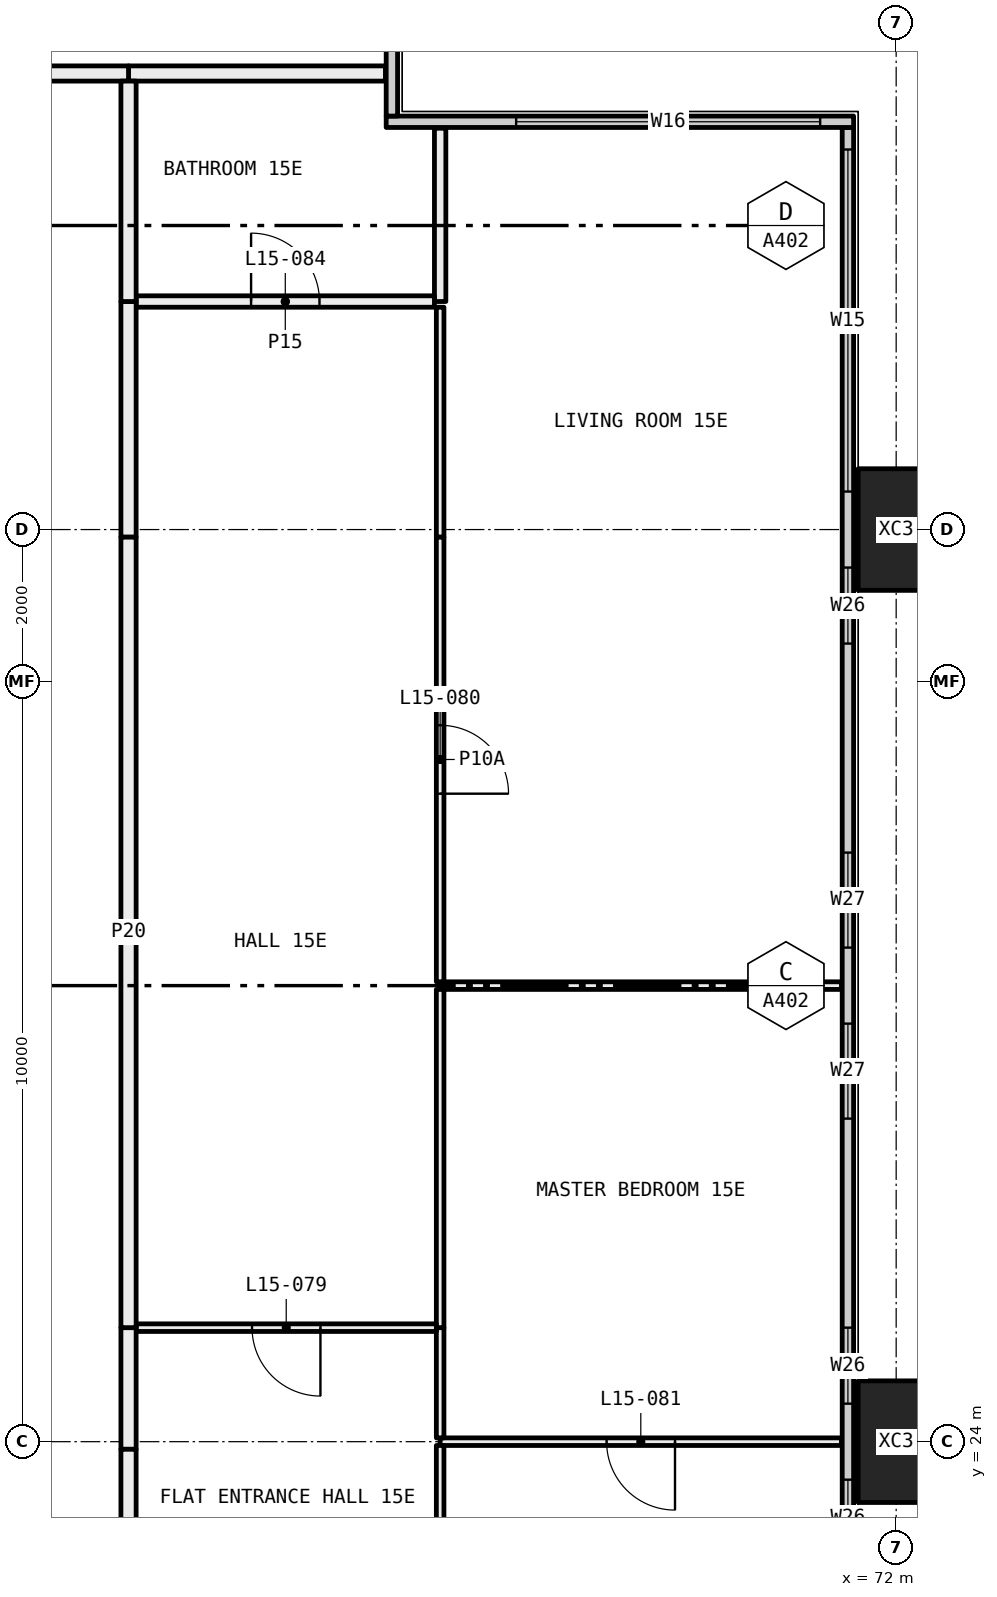
"""IFC4 building model, lengths in metres.
Left out: names, types, materials, properties, quantities, classifications, styles, units other than length and angle.
Written with IfcOpenShell. Run it as: python <this file> out.ifc"""

import sys

from ifc_helpers import new_model, si_unit, direction, frame, frame_2d, origin, origin_2d, place, context, subcontext, project, spatial, rectangle, hollow_rectangle, extrude, element, fill, save


model = new_model("IFC4")
c1 = context("Model", 3, precision=1e-05, world=origin(), true_north=direction((0.0, 1.0)))
c2 = subcontext(c1, "Body", "Model", "MODEL_VIEW")
j1 = project(units=[si_unit("LENGTHUNIT", "METRE"), si_unit("PLANEANGLEUNIT", "RADIAN")], contexts=[c1])
p1 = place(None, origin())
s1 = spatial("IfcSite", under=j1, at=p1, CompositionType="ELEMENT")
p2 = place(p1, origin())
s2 = spatial("IfcBuilding", under=s1, at=p2, CompositionType="ELEMENT")
p3 = place(p2, frame((0.0, 0.0, 64.5)))
s3 = spatial("IfcBuildingStorey", under=s2, at=p3, CompositionType="ELEMENT", Elevation=64.5)
for number, where, z_axis, x_axis in (
    (1, (72.0, 24.0, -0.4), (0.0, 0.0, 1.0), (0.0, 1.0, 0.0)),
    (2, (72.0, 36.0, -0.4), (0.0, 0.0, 1.0), (0.0, 1.0, 0.0)),
):
    element("IfcColumn", number, at=place(p3, frame(where, z_axis=z_axis, x_axis=x_axis)), inside=s3, PredefinedType="COLUMN", context=c2, shape_type="SweptSolid", body=[
        extrude(hollow_rectangle(XDim=1.6, YDim=1.0, WallThickness=0.065, at=origin_2d()), origin(), (0.0, 0.0, 1.0), 3.45),
    ])
p4 = place(p3, frame((71.365, 6.71, 0.0), z_axis=(0.0, 0.0, 1.0), x_axis=(0.0, 1.0, 0.0)))
e3 = element("IfcWall", 3, at=p4, inside=s3, PredefinedType="ELEMENTEDWALL", context=c2, shape_type="SweptSolid", body=[
    extrude(rectangle(XDim=34.58, YDim=0.15, at=frame_2d((17.29, 0.0))), origin(), (0.0, 0.0, 1.0), 3.05),
])
p5 = place(p4, frame((0.29, 0.0, 0.45)))
e4 = element("IfcOpeningElement", 4, at=p5, cuts=e3, PredefinedType="OPENING", context=c2, shape_type="SweptSolid", body=[
    extrude(rectangle(XDim=4.5, YDim=2.55, at=frame_2d((2.25, 1.275))), frame((0.0, 0.085, 0.0), z_axis=(0.0, -1.0, 0.0), x_axis=(1.0, 0.0, 0.0)), (0.0, 0.0, 1.0), 0.17),
])
p6 = place(p4, frame((5.79, 0.0, 0.45)))
e5 = element("IfcOpeningElement", 5, at=p6, cuts=e3, PredefinedType="OPENING", context=c2, shape_type="SweptSolid", body=[
    extrude(rectangle(XDim=1.0, YDim=2.55, at=frame_2d((0.5, 1.275))), frame((0.0, 0.085, 0.0), z_axis=(0.0, -1.0, 0.0), x_axis=(1.0, 0.0, 0.0)), (0.0, 0.0, 1.0), 0.17),
])
p7 = place(p4, frame((9.54, 0.0, 0.45)))
e6 = element("IfcOpeningElement", 6, at=p7, cuts=e3, PredefinedType="OPENING", context=c2, shape_type="SweptSolid", body=[
    extrude(rectangle(XDim=1.25, YDim=2.55, at=frame_2d((0.625, 1.275))), frame((0.0, 0.085, 0.0), z_axis=(0.0, -1.0, 0.0), x_axis=(1.0, 0.0, 0.0)), (0.0, 0.0, 1.0), 0.17),
])
p8 = place(p4, frame((11.79, 0.0, 0.45)))
e7 = element("IfcOpeningElement", 7, at=p8, cuts=e3, PredefinedType="OPENING", context=c2, shape_type="SweptSolid", body=[
    extrude(rectangle(XDim=1.25, YDim=2.55, at=frame_2d((0.625, 1.275))), frame((0.0, 0.085, 0.0), z_axis=(0.0, -1.0, 0.0), x_axis=(1.0, 0.0, 0.0)), (0.0, 0.0, 1.0), 0.17),
])
p9 = place(p4, frame((15.79, 0.0, 0.45)))
e8 = element("IfcOpeningElement", 8, at=p9, cuts=e3, PredefinedType="OPENING", context=c2, shape_type="SweptSolid", body=[
    extrude(rectangle(XDim=1.0, YDim=2.55, at=frame_2d((0.5, 1.275))), frame((0.0, 0.085, 0.0), z_axis=(0.0, -1.0, 0.0), x_axis=(1.0, 0.0, 0.0)), (0.0, 0.0, 1.0), 0.17),
])
p10 = place(p4, frame((17.79, 0.0, 0.45)))
e9 = element("IfcOpeningElement", 9, at=p10, cuts=e3, PredefinedType="OPENING", context=c2, shape_type="SweptSolid", body=[
    extrude(rectangle(XDim=1.0, YDim=2.55, at=frame_2d((0.5, 1.275))), frame((0.0, 0.085, 0.0), z_axis=(0.0, -1.0, 0.0), x_axis=(1.0, 0.0, 0.0)), (0.0, 0.0, 1.0), 0.17),
])
p11 = place(p4, frame((21.54, 0.0, 0.45)))
e10 = element("IfcOpeningElement", 10, at=p11, cuts=e3, PredefinedType="OPENING", context=c2, shape_type="SweptSolid", body=[
    extrude(rectangle(XDim=1.25, YDim=2.55, at=frame_2d((0.625, 1.275))), frame((0.0, 0.085, 0.0), z_axis=(0.0, -1.0, 0.0), x_axis=(1.0, 0.0, 0.0)), (0.0, 0.0, 1.0), 0.17),
])
p12 = place(p4, frame((23.79, 0.0, 0.45)))
e11 = element("IfcOpeningElement", 11, at=p12, cuts=e3, PredefinedType="OPENING", context=c2, shape_type="SweptSolid", body=[
    extrude(rectangle(XDim=1.25, YDim=2.55, at=frame_2d((0.625, 1.275))), frame((0.0, 0.085, 0.0), z_axis=(0.0, -1.0, 0.0), x_axis=(1.0, 0.0, 0.0)), (0.0, 0.0, 1.0), 0.17),
])
p13 = place(p4, frame((27.79, 0.0, 0.45)))
e12 = element("IfcOpeningElement", 12, at=p13, cuts=e3, PredefinedType="OPENING", context=c2, shape_type="SweptSolid", body=[
    extrude(rectangle(XDim=1.0, YDim=2.55, at=frame_2d((0.5, 1.275))), frame((0.0, 0.085, 0.0), z_axis=(0.0, -1.0, 0.0), x_axis=(1.0, 0.0, 0.0)), (0.0, 0.0, 1.0), 0.17),
])
p14 = place(p4, frame((29.79, 0.0, 0.45)))
e13 = element("IfcOpeningElement", 13, at=p14, cuts=e3, PredefinedType="OPENING", context=c2, shape_type="SweptSolid", body=[
    extrude(rectangle(XDim=4.5, YDim=2.55, at=frame_2d((2.25, 1.275))), frame((0.0, 0.085, 0.0), z_axis=(0.0, -1.0, 0.0), x_axis=(1.0, 0.0, 0.0)), (0.0, 0.0, 1.0), 0.17),
])
p15 = place(p3, frame((65.29, 41.365, 0.0), z_axis=(0.0, 0.0, 1.0), x_axis=(1.0, 0.0, 0.0)))
e14 = element("IfcWall", 14, at=p15, inside=s3, PredefinedType="ELEMENTEDWALL", context=c2, shape_type="SweptSolid", body=[
    extrude(rectangle(XDim=6.15, YDim=0.15, at=frame_2d((3.075, 0.0))), origin(), (0.0, 0.0, 1.0), 3.05),
])
p16 = place(p15, frame((1.71, 0.0, 0.45)))
e15 = element("IfcOpeningElement", 15, at=p16, cuts=e14, PredefinedType="OPENING", context=c2, shape_type="SweptSolid", body=[
    extrude(rectangle(XDim=4.0, YDim=2.55, at=frame_2d((2.0, 1.275))), frame((0.0, 0.085, 0.0), z_axis=(0.0, -1.0, 0.0), x_axis=(1.0, 0.0, 0.0)), (0.0, 0.0, 1.0), 0.17),
])
p17 = place(p3, frame((65.365, 41.44, 0.0), z_axis=(0.0, 0.0, 1.0), x_axis=(0.0, 1.0, 0.0)))
e16 = element("IfcWall", 16, at=p17, inside=s3, PredefinedType="ELEMENTEDWALL", context=c2, shape_type="SweptSolid", body=[
    extrude(rectangle(XDim=5.85, YDim=0.15, at=frame_2d((2.925, 0.0))), origin(), (0.0, 0.0, 1.0), 3.05),
])
p18 = place(p17, frame((1.56, 0.0, 0.45)))
e17 = element("IfcOpeningElement", 17, at=p18, cuts=e16, PredefinedType="OPENING", context=c2, shape_type="SweptSolid", body=[
    extrude(rectangle(XDim=4.0, YDim=2.55, at=frame_2d((2.0, 1.275))), frame((0.0, 0.085, 0.0), z_axis=(0.0, -1.0, 0.0), x_axis=(1.0, 0.0, 0.0)), (0.0, 0.0, 1.0), 0.17),
])
p19 = place(p3, frame((61.9, 42.0, 0.0), z_axis=(0.0, 0.0, 1.0), x_axis=(1.0, 0.0, 0.0)))
e18 = element("IfcWall", 18, at=p19, inside=s3, PredefinedType="PARTITIONING", context=c2, shape_type="SweptSolid", body=[
    extrude(rectangle(XDim=3.38, YDim=0.2, at=frame_2d((1.69, 0.0))), origin(), (0.0, 0.0, 1.0), 3.05),
])
p20 = place(p3, frame((54.0, 42.0, 0.0), z_axis=(0.0, 0.0, 1.0), x_axis=(1.0, 0.0, 0.0)))
e19 = element("IfcWall", 19, at=p20, inside=s3, PredefinedType="PARTITIONING", context=c2, shape_type="SweptSolid", body=[
    extrude(rectangle(XDim=7.9, YDim=0.2, at=frame_2d((3.95, 0.0))), origin(), (0.0, 0.0, 1.0), 3.05),
])
p21 = place(p3, frame((71.28, 24.0, 0.0), z_axis=(0.0, 0.0, 1.0), x_axis=(-1.0, 0.0, 0.0)))
e20 = element("IfcWall", 20, at=p21, inside=s3, PredefinedType="PARTITIONING", context=c2, shape_type="SweptSolid", body=[
    extrude(rectangle(XDim=5.28, YDim=0.1, at=frame_2d((2.64, 0.0))), origin(), (0.0, 0.0, 1.0), 2.45),
])
p22 = place(p21, frame((2.19, 0.0, 0.0)))
e21 = element("IfcOpeningElement", 21, at=p22, cuts=e20, PredefinedType="OPENING", context=c2, shape_type="SweptSolid", body=[
    extrude(rectangle(XDim=0.9, YDim=2.1, at=frame_2d((0.45, 1.05))), frame((0.0, 0.06, 0.0), z_axis=(0.0, -1.0, 0.0), x_axis=(1.0, 0.0, 0.0)), (0.0, 0.0, 1.0), 0.12),
])
p23 = place(p3, frame((66.0, 23.95, 0.0), z_axis=(0.0, 0.0, 1.0), x_axis=(0.0, -1.0, 0.0)))
e22 = element("IfcWall", 22, at=p23, inside=s3, PredefinedType="PARTITIONING", context=c2, shape_type="SweptSolid", body=[
    extrude(rectangle(XDim=2.875, YDim=0.1, at=frame_2d((1.438, 0.0))), origin(), (0.0, 0.0, 1.0), 2.45),
])
p24 = place(p23, frame((0.988, 0.0, 0.0)))
e23 = element("IfcOpeningElement", 23, at=p24, cuts=e22, PredefinedType="OPENING", context=c2, shape_type="SweptSolid", body=[
    extrude(rectangle(XDim=0.9, YDim=2.1, at=frame_2d((0.45, 1.05))), frame((0.0, 0.06, 0.0), z_axis=(0.0, -1.0, 0.0), x_axis=(1.0, 0.0, 0.0)), (0.0, 0.0, 1.0), 0.12),
])
p25 = place(p3, frame((71.28, 30.0, 0.0), z_axis=(0.0, 0.0, 1.0), x_axis=(-1.0, 0.0, 0.0)))
e24 = element("IfcWall", 24, at=p25, inside=s3, PredefinedType="PARTITIONING", context=c2, shape_type="SweptSolid", body=[
    extrude(rectangle(XDim=5.28, YDim=0.1, at=frame_2d((2.64, 0.0))), origin(), (0.0, 0.0, 1.0), 3.05),
])
p26 = place(p3, frame((66.0, 25.5, 0.0), z_axis=(0.0, 0.0, 1.0), x_axis=(0.0, -1.0, 0.0)))
e25 = element("IfcWall", 25, at=p26, inside=s3, PredefinedType="PARTITIONING", context=c2, shape_type="SweptSolid", body=[
    extrude(rectangle(XDim=1.45, YDim=0.1, at=frame_2d((0.725, 0.0))), origin(), (0.0, 0.0, 1.0), 2.45),
])
p27 = place(p3, frame((66.0, 29.95, 0.0), z_axis=(0.0, 0.0, 1.0), x_axis=(0.0, -1.0, 0.0)))
e26 = element("IfcWall", 26, at=p27, inside=s3, PredefinedType="PARTITIONING", context=c2, shape_type="SweptSolid", body=[
    extrude(rectangle(XDim=4.45, YDim=0.1, at=frame_2d((2.225, 0.0))), origin(), (0.0, 0.0, 1.0), 3.05),
])
p28 = place(p3, frame((66.0, 38.925, 0.0), z_axis=(0.0, 0.0, 1.0), x_axis=(0.0, -1.0, 0.0)))
e27 = element("IfcWall", 27, at=p28, inside=s3, PredefinedType="PARTITIONING", context=c2, shape_type="SweptSolid", body=[
    extrude(rectangle(XDim=3.025, YDim=0.1, at=frame_2d((1.513, 0.0))), origin(), (0.0, 0.0, 1.0), 2.45),
])
p29 = place(p3, frame((66.0, 35.9, 0.0), z_axis=(0.0, 0.0, 1.0), x_axis=(0.0, -1.0, 0.0)))
e28 = element("IfcWall", 28, at=p29, inside=s3, PredefinedType="PARTITIONING", context=c2, shape_type="SweptSolid", body=[
    extrude(rectangle(XDim=5.85, YDim=0.1, at=frame_2d((2.925, 0.0))), origin(), (0.0, 0.0, 1.0), 3.05),
])
p30 = place(p29, frame((2.475, 0.0, 0.0)))
e29 = element("IfcOpeningElement", 29, at=p30, cuts=e28, PredefinedType="OPENING", context=c2, shape_type="SweptSolid", body=[
    extrude(rectangle(XDim=0.9, YDim=2.1, at=frame_2d((0.45, 1.05))), frame((0.0, 0.06, 0.0), z_axis=(0.0, -1.0, 0.0), x_axis=(1.0, 0.0, 0.0)), (0.0, 0.0, 1.0), 0.12),
])
p31 = place(p3, frame((66.0, 41.28, 0.0), z_axis=(0.0, 0.0, 1.0), x_axis=(0.0, -1.0, 0.0)))
e30 = element("IfcWall", 30, at=p31, inside=s3, PredefinedType="PARTITIONING", context=c2, shape_type="SweptSolid", body=[
    extrude(rectangle(XDim=2.28, YDim=0.15, at=frame_2d((1.14, 0.0))), origin(), (0.0, 0.0, 1.0), 3.05),
])
p32 = place(p3, frame((65.95, 25.5, 0.0), z_axis=(0.0, 0.0, 1.0), x_axis=(-1.0, 0.0, 0.0)))
e31 = element("IfcWall", 31, at=p32, inside=s3, PredefinedType="PARTITIONING", context=c2, shape_type="SweptSolid", body=[
    extrude(rectangle(XDim=3.95, YDim=0.1, at=frame_2d((1.975, 0.0))), origin(), (0.0, 0.0, 1.0), 3.05),
])
p33 = place(p32, frame((1.525, 0.0, 0.0)))
e32 = element("IfcOpeningElement", 32, at=p33, cuts=e31, PredefinedType="OPENING", context=c2, shape_type="SweptSolid", body=[
    extrude(rectangle(XDim=0.9, YDim=2.1, at=frame_2d((0.45, 1.05))), frame((0.0, 0.06, 0.0), z_axis=(0.0, -1.0, 0.0), x_axis=(1.0, 0.0, 0.0)), (0.0, 0.0, 1.0), 0.12),
])
p34 = place(p3, frame((61.9, 25.5, 0.0), z_axis=(0.0, 0.0, 1.0), x_axis=(0.0, -1.0, 0.0)))
e33 = element("IfcWall", 33, at=p34, inside=s3, PredefinedType="PARTITIONING", context=c2, shape_type="SweptSolid", body=[
    extrude(rectangle(XDim=1.6, YDim=0.2, at=frame_2d((0.8, 0.0))), origin(), (0.0, 0.0, 1.0), 2.45),
])
p35 = place(p3, frame((61.9, 23.9, 0.0), z_axis=(0.0, 0.0, 1.0), x_axis=(0.0, -1.0, 0.0)))
e34 = element("IfcWall", 34, at=p35, inside=s3, PredefinedType="PARTITIONING", context=c2, shape_type="SweptSolid", body=[
    extrude(rectangle(XDim=2.9, YDim=0.2, at=frame_2d((1.45, 0.0))), origin(), (0.0, 0.0, 1.0), 3.05),
])
p36 = place(p35, frame((0.95, 0.0, 0.0)))
e35 = element("IfcOpeningElement", 35, at=p36, cuts=e34, PredefinedType="OPENING", context=c2, shape_type="SweptSolid", body=[
    extrude(rectangle(XDim=1.0, YDim=2.1, at=frame_2d((0.5, 1.05))), frame((0.0, 0.11, 0.0), z_axis=(0.0, -1.0, 0.0), x_axis=(1.0, 0.0, 0.0)), (0.0, 0.0, 1.0), 0.22),
])
p37 = place(p3, frame((65.925, 39.0, 0.0), z_axis=(0.0, 0.0, 1.0), x_axis=(-1.0, 0.0, 0.0)))
e36 = element("IfcWall", 36, at=p37, inside=s3, PredefinedType="PARTITIONING", context=c2, shape_type="SweptSolid", body=[
    extrude(rectangle(XDim=3.925, YDim=0.15, at=frame_2d((1.962, 0.0))), origin(), (0.0, 0.0, 1.0), 3.05),
])
p38 = place(p37, frame((1.512, 0.0, 0.0)))
e37 = element("IfcOpeningElement", 37, at=p38, cuts=e36, PredefinedType="OPENING", context=c2, shape_type="SweptSolid", body=[
    extrude(rectangle(XDim=0.9, YDim=2.1, at=frame_2d((0.45, 1.05))), frame((0.0, 0.085, 0.0), z_axis=(0.0, -1.0, 0.0), x_axis=(1.0, 0.0, 0.0)), (0.0, 0.0, 1.0), 0.17),
])
p39 = place(p3, frame((61.9, 39.0, 0.0), z_axis=(0.0, 0.0, 1.0), x_axis=(0.0, -1.0, 0.0)))
e38 = element("IfcWall", 38, at=p39, inside=s3, PredefinedType="PARTITIONING", context=c2, shape_type="SweptSolid", body=[
    extrude(rectangle(XDim=3.1, YDim=0.2, at=frame_2d((1.55, 0.0))), origin(), (0.0, 0.0, 1.0), 2.45),
])
p40 = place(p3, frame((61.9, 35.9, 0.0), z_axis=(0.0, 0.0, 1.0), x_axis=(0.0, -1.0, 0.0)))
e39 = element("IfcWall", 39, at=p40, inside=s3, PredefinedType="PARTITIONING", context=c2, shape_type="SweptSolid", body=[
    extrude(rectangle(XDim=10.4, YDim=0.2, at=frame_2d((5.2, 0.0))), origin(), (0.0, 0.0, 1.0), 3.05),
])
p41 = place(p3, frame((61.9, 41.9, 0.0), z_axis=(0.0, 0.0, 1.0), x_axis=(0.0, -1.0, 0.0)))
e40 = element("IfcWall", 40, at=p41, inside=s3, PredefinedType="PARTITIONING", context=c2, shape_type="SweptSolid", body=[
    extrude(rectangle(XDim=2.9, YDim=0.2, at=frame_2d((1.45, 0.0))), origin(), (0.0, 0.0, 1.0), 3.05),
])
p42 = place(p9, origin())
e41 = element("IfcWindow", 41, at=p42, inside=s3, PartitioningType="SINGLE_PANEL", PredefinedType="WINDOW", context=c2, shape_type="SweptSolid", body=[
    extrude(rectangle(XDim=1.0, YDim=2.55, at=frame_2d((0.5, 1.275))), frame((0.0, 0.03, 0.0), z_axis=(0.0, -1.0, 0.0), x_axis=(1.0, 0.0, 0.0)), (0.0, 0.0, 1.0), 0.06),
])
fill(e8, e41)
p43 = place(p10, origin())
e42 = element("IfcWindow", 42, at=p43, inside=s3, PartitioningType="SINGLE_PANEL", PredefinedType="WINDOW", context=c2, shape_type="SweptSolid", body=[
    extrude(rectangle(XDim=1.0, YDim=2.55, at=frame_2d((0.5, 1.275))), frame((0.0, 0.03, 0.0), z_axis=(0.0, -1.0, 0.0), x_axis=(1.0, 0.0, 0.0)), (0.0, 0.0, 1.0), 0.06),
])
fill(e9, e42)
p44 = place(p11, origin())
e43 = element("IfcWindow", 43, at=p44, inside=s3, PartitioningType="SINGLE_PANEL", PredefinedType="WINDOW", context=c2, shape_type="SweptSolid", body=[
    extrude(rectangle(XDim=1.25, YDim=2.55, at=frame_2d((0.625, 1.275))), frame((0.0, 0.03, 0.0), z_axis=(0.0, -1.0, 0.0), x_axis=(1.0, 0.0, 0.0)), (0.0, 0.0, 1.0), 0.06),
])
fill(e10, e43)
p45 = place(p12, origin())
e44 = element("IfcWindow", 44, at=p45, inside=s3, PartitioningType="SINGLE_PANEL", PredefinedType="WINDOW", context=c2, shape_type="SweptSolid", body=[
    extrude(rectangle(XDim=1.25, YDim=2.55, at=frame_2d((0.625, 1.275))), frame((0.0, 0.03, 0.0), z_axis=(0.0, -1.0, 0.0), x_axis=(1.0, 0.0, 0.0)), (0.0, 0.0, 1.0), 0.06),
])
fill(e11, e44)
p46 = place(p13, origin())
e45 = element("IfcWindow", 45, at=p46, inside=s3, PartitioningType="SINGLE_PANEL", PredefinedType="WINDOW", context=c2, shape_type="SweptSolid", body=[
    extrude(rectangle(XDim=1.0, YDim=2.55, at=frame_2d((0.5, 1.275))), frame((0.0, 0.03, 0.0), z_axis=(0.0, -1.0, 0.0), x_axis=(1.0, 0.0, 0.0)), (0.0, 0.0, 1.0), 0.06),
])
fill(e12, e45)
p47 = place(p14, origin())
e46 = element("IfcWindow", 46, at=p47, inside=s3, PartitioningType="SINGLE_PANEL", PredefinedType="WINDOW", context=c2, shape_type="SweptSolid", body=[
    extrude(rectangle(XDim=4.5, YDim=2.55, at=frame_2d((2.25, 1.275))), frame((0.0, 0.03, 0.0), z_axis=(0.0, -1.0, 0.0), x_axis=(1.0, 0.0, 0.0)), (0.0, 0.0, 1.0), 0.06),
])
fill(e13, e46)
p48 = place(p16, origin())
e47 = element("IfcWindow", 47, at=p48, inside=s3, PartitioningType="SINGLE_PANEL", PredefinedType="WINDOW", context=c2, shape_type="SweptSolid", body=[
    extrude(rectangle(XDim=4.0, YDim=2.55, at=frame_2d((2.0, 1.275))), frame((0.0, 0.03, 0.0), z_axis=(0.0, -1.0, 0.0), x_axis=(1.0, 0.0, 0.0)), (0.0, 0.0, 1.0), 0.06),
])
fill(e15, e47)
p49 = place(p33, origin())
e48 = element("IfcDoor", 48, at=p49, inside=s3, OperationType="SINGLE_SWING_RIGHT", PredefinedType="DOOR", context=c2, shape_type="SweptSolid", body=[
    extrude(rectangle(XDim=0.9, YDim=2.1, at=frame_2d((0.45, 1.05))), frame((0.0, 0.025, 0.0), z_axis=(0.0, -1.0, 0.0), x_axis=(1.0, 0.0, 0.0)), (0.0, 0.0, 1.0), 0.05),
])
fill(e32, e48)
p50 = place(p30, origin())
e49 = element("IfcDoor", 49, at=p50, inside=s3, OperationType="SINGLE_SWING_LEFT", PredefinedType="DOOR", context=c2, shape_type="SweptSolid", body=[
    extrude(rectangle(XDim=0.9, YDim=2.1, at=frame_2d((0.45, 1.05))), frame((0.0, 0.025, 0.0), z_axis=(0.0, -1.0, 0.0), x_axis=(1.0, 0.0, 0.0)), (0.0, 0.0, 1.0), 0.05),
])
fill(e29, e49)
p51 = place(p22, origin())
e50 = element("IfcDoor", 50, at=p51, inside=s3, OperationType="SINGLE_SWING_RIGHT", PredefinedType="DOOR", context=c2, shape_type="SweptSolid", body=[
    extrude(rectangle(XDim=0.9, YDim=2.1, at=frame_2d((0.45, 1.05))), frame((0.0, 0.025, 0.0), z_axis=(0.0, -1.0, 0.0), x_axis=(1.0, 0.0, 0.0)), (0.0, 0.0, 1.0), 0.05),
])
fill(e21, e50)
p52 = place(p38, frame((0.9, 0.0, 0.0), x_axis=(-1.0, 0.0, 0.0)))
e51 = element("IfcDoor", 51, at=p52, inside=s3, OperationType="SINGLE_SWING_RIGHT", PredefinedType="DOOR", context=c2, shape_type="SweptSolid", body=[
    extrude(rectangle(XDim=0.9, YDim=2.1, at=frame_2d((0.45, 1.05))), frame((0.0, 0.025, 0.0), z_axis=(0.0, -1.0, 0.0), x_axis=(1.0, 0.0, 0.0)), (0.0, 0.0, 1.0), 0.05),
])
fill(e37, e51)
save(model, sys.argv[1])
